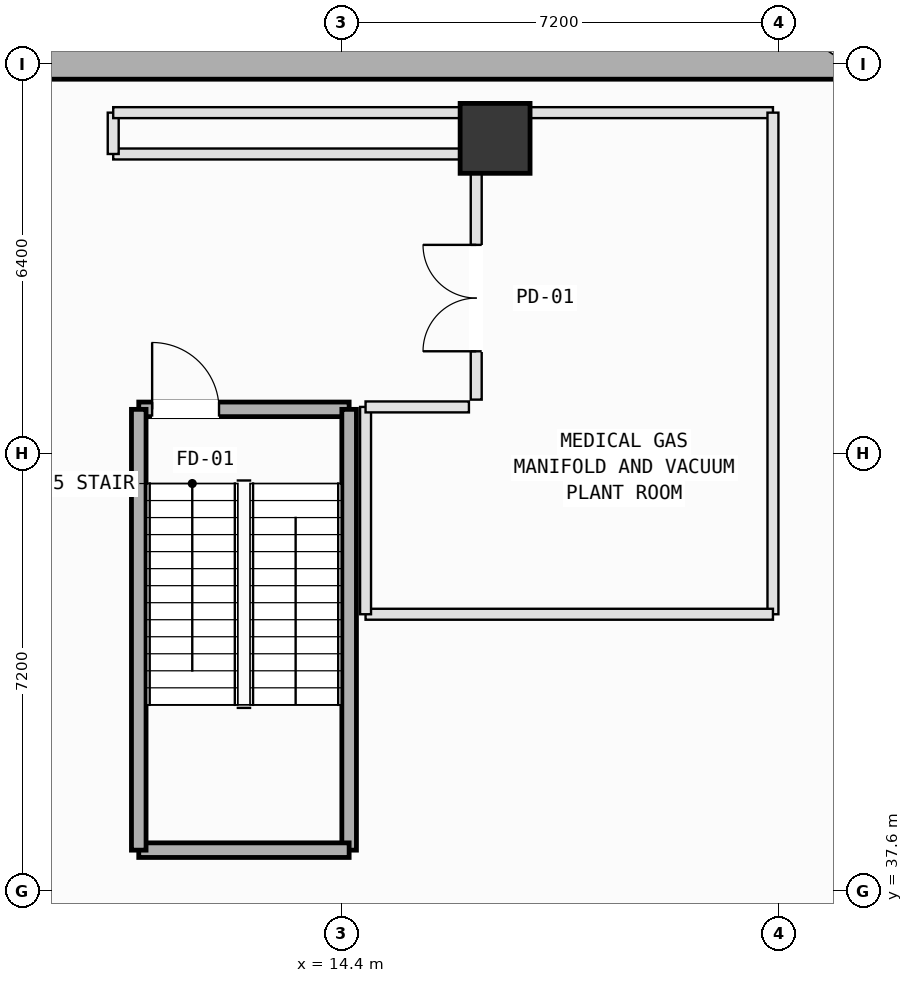
"""IFC4 building model, lengths in metres.
Left out: names, types, materials, properties, quantities, classifications, styles, units other than length and angle.
Written with IfcOpenShell. Run it as: python <this file> out.ifc"""

import sys

from ifc_helpers import new_model, si_unit, direction, frame, frame_2d, origin, origin_2d, place, context, subcontext, project, spatial, rectangle, extrude, element, fill, save


model = new_model("IFC4")
c1 = context("Model", 3, precision=1e-05, world=origin(), true_north=direction((0.0, 1.0)))
c2 = subcontext(c1, "Body", "Model", "MODEL_VIEW")
j1 = project(units=[si_unit("LENGTHUNIT", "METRE"), si_unit("PLANEANGLEUNIT", "RADIAN")], contexts=[c1])
p1 = place(None, origin())
s1 = spatial("IfcSite", under=j1, at=p1, CompositionType="ELEMENT")
p2 = place(p1, origin())
s2 = spatial("IfcBuilding", under=s1, at=p2, CompositionType="ELEMENT")
p3 = place(p2, frame((0.0, 0.0, -9.6)))
s3 = spatial("IfcBuildingStorey", under=s2, at=p3, CompositionType="ELEMENT", Elevation=-9.6)
p4 = place(p3, frame((16.93, 49.977, 0.0), z_axis=(0.0, 0.0, 1.0), x_axis=(1.0, 0.0, 0.0)))
e1 = element("IfcColumn", 1, at=p4, inside=s3, PredefinedType="COLUMN", context=c2, shape_type="SweptSolid", body=[
    extrude(rectangle(XDim=1.15, YDim=1.15, at=origin_2d()), origin(), (0.0, 0.0, 1.0), 4.8),
])
p5 = place(p3, frame((3.0, 51.2, 0.0), z_axis=(0.0, 0.0, 1.0), x_axis=(1.0, 0.0, 0.0)))
e2 = element("IfcWall", 2, at=p5, inside=s3, PredefinedType="USERDEFINED", context=c2, shape_type="SweptSolid", body=[
    extrude(rectangle(XDim=27.5, YDim=0.5, at=frame_2d((13.75, 0.0))), origin(), (0.0, 0.0, 1.0), 4.55),
])
p6 = place(p3, frame((11.07, 45.52, 0.0), z_axis=(0.0, 0.0, 1.0), x_axis=(1.0, 0.0, 0.0)))
e3 = element("IfcWall", 3, at=p6, inside=s3, PredefinedType="SOLIDWALL", context=c2, shape_type="SweptSolid", body=[
    extrude(rectangle(XDim=3.46, YDim=0.24, at=frame_2d((1.73, 0.0))), origin(), (0.0, 0.0, 1.0), 4.55),
])
p7 = place(p6, frame((0.22, 0.0, 0.0)))
e4 = element("IfcOpeningElement", 4, at=p7, cuts=e3, PredefinedType="OPENING", context=c2, shape_type="SweptSolid", body=[
    extrude(rectangle(XDim=1.1, YDim=2.15, at=frame_2d((0.55, 1.075))), frame((0.0, 0.13, 0.0), z_axis=(0.0, -1.0, 0.0), x_axis=(1.0, 0.0, 0.0)), (0.0, 0.0, 1.0), 0.26),
])
p8 = place(p3, frame((14.53, 45.52, 0.0), z_axis=(0.0, 0.0, 1.0), x_axis=(0.0, -1.0, 0.0)))
e5 = element("IfcWall", 5, at=p8, inside=s3, PredefinedType="SOLIDWALL", context=c2, shape_type="SweptSolid", body=[
    extrude(rectangle(XDim=7.25, YDim=0.24, at=frame_2d((3.625, 0.0))), origin(), (0.0, 0.0, 1.0), 4.55),
])
p9 = place(p3, frame((14.53, 38.27, 0.0), z_axis=(0.0, 0.0, 1.0), x_axis=(-1.0, 0.0, 0.0)))
e6 = element("IfcWall", 6, at=p9, inside=s3, PredefinedType="SOLIDWALL", context=c2, shape_type="SweptSolid", body=[
    extrude(rectangle(XDim=3.46, YDim=0.24, at=frame_2d((1.73, 0.0))), origin(), (0.0, 0.0, 1.0), 4.55),
])
p10 = place(p3, frame((11.07, 38.27, 0.0), z_axis=(0.0, 0.0, 1.0), x_axis=(0.0, 1.0, 0.0)))
e7 = element("IfcWall", 7, at=p10, inside=s3, PredefinedType="SOLIDWALL", context=c2, shape_type="SweptSolid", body=[
    extrude(rectangle(XDim=7.25, YDim=0.24, at=frame_2d((3.625, 0.0))), origin(), (0.0, 0.0, 1.0), 4.55),
])
p11 = place(p3, frame((16.62, 45.68, 0.0), z_axis=(0.0, 0.0, 1.0), x_axis=(0.0, 1.0, 0.0)))
e8 = element("IfcWall", 8, at=p11, inside=s3, PredefinedType="PARTITIONING", context=c2, shape_type="SweptSolid", body=[
    extrude(rectangle(XDim=3.92, YDim=0.18, at=frame_2d((1.96, 0.0))), origin(), (0.0, 0.0, 1.0), 4.55),
])
p12 = place(p11, frame((0.795, 0.0, 0.0)))
e9 = element("IfcOpeningElement", 9, at=p12, cuts=e8, PredefinedType="OPENING", context=c2, shape_type="SweptSolid", body=[
    extrude(rectangle(XDim=1.75, YDim=2.2, at=frame_2d((0.875, 1.1))), frame((0.0, 0.1, 0.0), z_axis=(0.0, -1.0, 0.0), x_axis=(1.0, 0.0, 0.0)), (0.0, 0.0, 1.0), 0.2),
])
p13 = place(p3, frame((16.5, 49.72, 0.0), z_axis=(0.0, 0.0, 1.0), x_axis=(-1.0, 0.0, 0.0)))
e10 = element("IfcWall", 10, at=p13, inside=s3, PredefinedType="PARTITIONING", context=c2, shape_type="SweptSolid", body=[
    extrude(rectangle(XDim=5.85, YDim=0.18, at=frame_2d((2.925, 0.0))), origin(), (0.0, 0.0, 1.0), 3.735),
])
p14 = place(p3, frame((10.65, 49.72, 0.0), z_axis=(0.0, 0.0, 1.0), x_axis=(0.0, 1.0, 0.0)))
e11 = element("IfcWall", 11, at=p14, inside=s3, PredefinedType="PARTITIONING", context=c2, shape_type="SweptSolid", body=[
    extrude(rectangle(XDim=0.68, YDim=0.18, at=frame_2d((0.34, 0.0))), origin(), (0.0, 0.0, 1.0), 4.55),
])
p15 = place(p3, frame((10.65, 50.4, 0.0), z_axis=(0.0, 0.0, 1.0), x_axis=(1.0, 0.0, 0.0)))
e12 = element("IfcWall", 12, at=p15, inside=s3, PredefinedType="PARTITIONING", context=c2, shape_type="SweptSolid", body=[
    extrude(rectangle(XDim=10.85, YDim=0.18, at=frame_2d((5.425, 0.0))), origin(), (0.0, 0.0, 1.0), 3.735),
])
p16 = place(p3, frame((21.5, 50.4, 0.0), z_axis=(0.0, 0.0, 1.0), x_axis=(0.0, -1.0, 0.0)))
e13 = element("IfcWall", 13, at=p16, inside=s3, PredefinedType="PARTITIONING", context=c2, shape_type="SweptSolid", body=[
    extrude(rectangle(XDim=8.25, YDim=0.18, at=frame_2d((4.125, 0.0))), origin(), (0.0, 0.0, 1.0), 4.55),
])
p17 = place(p3, frame((21.5, 42.15, 0.0), z_axis=(0.0, 0.0, 1.0), x_axis=(-1.0, 0.0, 0.0)))
e14 = element("IfcWall", 14, at=p17, inside=s3, PredefinedType="PARTITIONING", context=c2, shape_type="SweptSolid", body=[
    extrude(rectangle(XDim=6.7, YDim=0.18, at=frame_2d((3.35, 0.0))), origin(), (0.0, 0.0, 1.0), 4.55),
])
p18 = place(p3, frame((14.8, 42.15, 0.0), z_axis=(0.0, 0.0, 1.0), x_axis=(0.0, 1.0, 0.0)))
e15 = element("IfcWall", 15, at=p18, inside=s3, PredefinedType="PARTITIONING", context=c2, shape_type="SweptSolid", body=[
    extrude(rectangle(XDim=3.41, YDim=0.18, at=frame_2d((1.705, 0.0))), origin(), (0.0, 0.0, 1.0), 4.55),
])
p19 = place(p3, frame((14.8, 45.56, 0.0), z_axis=(0.0, 0.0, 1.0), x_axis=(1.0, 0.0, 0.0)))
e16 = element("IfcWall", 16, at=p19, inside=s3, PredefinedType="PARTITIONING", context=c2, shape_type="SweptSolid", body=[
    extrude(rectangle(XDim=1.7, YDim=0.18, at=frame_2d((0.85, 0.0))), origin(), (0.0, 0.0, 1.0), 4.55),
])
p20 = place(p7, origin())
e17 = element("IfcDoor", 17, at=p20, inside=s3, OperationType="SINGLE_SWING_LEFT", PredefinedType="DOOR", context=c2, shape_type="SweptSolid", body=[
    extrude(rectangle(XDim=1.1, YDim=2.15, at=frame_2d((0.55, 1.075))), frame((0.0, 0.025, 0.0), z_axis=(0.0, -1.0, 0.0), x_axis=(1.0, 0.0, 0.0)), (0.0, 0.0, 1.0), 0.05),
])
fill(e4, e17)
p21 = place(p12, origin())
e18 = element("IfcDoor", 18, at=p21, inside=s3, OperationType="DOUBLE_DOOR_SINGLE_SWING", PredefinedType="DOOR", context=c2, shape_type="SweptSolid", body=[
    extrude(rectangle(XDim=1.75, YDim=2.2, at=frame_2d((0.875, 1.1))), frame((0.0, 0.025, 0.0), z_axis=(0.0, -1.0, 0.0), x_axis=(1.0, 0.0, 0.0)), (0.0, 0.0, 1.0), 0.05),
])
fill(e9, e18)
save(model, sys.argv[1])
